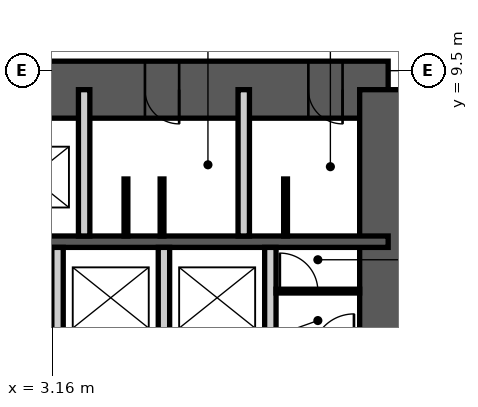
"""IFC4 building model, lengths in metres.
Left out: names, types, materials, properties, quantities, classifications, styles, units other than length and angle.
Written with IfcOpenShell. Run it as: python <this file> out.ifc"""

import sys

from ifc_helpers import new_model, si_unit, direction, frame, frame_2d, origin, place, context, subcontext, project, spatial, rectangle, extrude, element, fill, save


model = new_model("IFC4")
c1 = context("Model", 3, precision=1e-05, world=origin(), true_north=direction((0.0, 1.0)))
c2 = subcontext(c1, "Body", "Model", "MODEL_VIEW")
j1 = project(units=[si_unit("LENGTHUNIT", "METRE"), si_unit("PLANEANGLEUNIT", "RADIAN")], contexts=[c1])
p1 = place(None, origin())
s1 = spatial("IfcSite", under=j1, at=p1, CompositionType="ELEMENT")
p2 = place(p1, origin())
s2 = spatial("IfcBuilding", under=s1, at=p2, CompositionType="ELEMENT")
p3 = place(p2, frame((0.0, 0.0, 62.0)))
s3 = spatial("IfcBuildingStorey", under=s2, at=p3, CompositionType="ELEMENT", Elevation=62.0)
p4 = place(p3, frame((-12.0, 9.0, 0.0), z_axis=(0.0, 0.0, 1.0), x_axis=(1.0, 0.0, 0.0)))
e1 = element("IfcWall", 1, at=p4, inside=s3, PredefinedType="SHEAR", context=c2, shape_type="SweptSolid", body=[
    extrude(rectangle(XDim=24.0, YDim=1.5, at=frame_2d((12.0, 0.0))), origin(), (0.0, 0.0, 1.0), 5.0),
])
p5 = place(p4, frame((10.4, 0.0, 0.0)))
e2 = element("IfcOpeningElement", 2, at=p5, cuts=e1, PredefinedType="OPENING", context=c2, shape_type="SweptSolid", body=[
    extrude(rectangle(XDim=1.0, YDim=2.1, at=frame_2d((0.5, 1.05))), frame((0.0, 0.76, 0.0), z_axis=(0.0, -1.0, 0.0), x_axis=(1.0, 0.0, 0.0)), (0.0, 0.0, 1.0), 1.52),
])
p6 = place(p4, frame((17.6, 0.0, 0.0)))
e3 = element("IfcOpeningElement", 3, at=p6, cuts=e1, PredefinedType="OPENING", context=c2, shape_type="SweptSolid", body=[
    extrude(rectangle(XDim=0.9, YDim=2.1, at=frame_2d((0.45, 1.05))), frame((0.0, 0.76, 0.0), z_axis=(0.0, -1.0, 0.0), x_axis=(1.0, 0.0, 0.0)), (0.0, 0.0, 1.0), 1.52),
])
p7 = place(p4, frame((21.9, 0.0, 0.0)))
e4 = element("IfcOpeningElement", 4, at=p7, cuts=e1, PredefinedType="OPENING", context=c2, shape_type="SweptSolid", body=[
    extrude(rectangle(XDim=0.9, YDim=2.1, at=frame_2d((0.45, 1.05))), frame((0.0, 0.76, 0.0), z_axis=(0.0, -1.0, 0.0), x_axis=(1.0, 0.0, 0.0)), (0.0, 0.0, 1.0), 1.52),
])
p8 = place(p3, frame((12.0, -9.0, 0.0), z_axis=(0.0, 0.0, 1.0), x_axis=(0.0, 1.0, 0.0)))
e5 = element("IfcWall", 5, at=p8, inside=s3, PredefinedType="SHEAR", context=c2, shape_type="SweptSolid", body=[
    extrude(rectangle(XDim=18.0, YDim=1.5, at=frame_2d((9.0, 0.0))), origin(), (0.0, 0.0, 1.0), 5.0),
])
p9 = place(p8, frame((8.1, 0.0, 0.0)))
e6 = element("IfcOpeningElement", 6, at=p9, cuts=e5, PredefinedType="OPENING", context=c2, shape_type="SweptSolid", body=[
    extrude(rectangle(XDim=1.8, YDim=2.1, at=frame_2d((0.9, 1.05))), frame((0.0, 0.76, 0.0), z_axis=(0.0, -1.0, 0.0), x_axis=(1.0, 0.0, 0.0)), (0.0, 0.0, 1.0), 1.52),
])
p10 = place(p3, frame((-12.0, 5.0, 0.0), z_axis=(0.0, 0.0, 1.0), x_axis=(1.0, 0.0, 0.0)))
e7 = element("IfcWall", 7, at=p10, inside=s3, PredefinedType="SHEAR", context=c2, shape_type="SweptSolid", body=[
    extrude(rectangle(XDim=24.0, YDim=0.3, at=frame_2d((12.0, 0.0))), origin(), (0.0, 0.0, 1.0), 5.0),
])
for number, where, z_axis, x_axis in (
    (8, (4.0, 5.15, 0.0), (0.0, 0.0, 1.0), (0.0, 1.0, 0.0)),
    (9, (8.2, 5.15, 0.0), (0.0, 0.0, 1.0), (0.0, 1.0, 0.0)),
):
    element("IfcWall", number, at=place(p3, frame(where, z_axis=z_axis, x_axis=x_axis)), inside=s3, PredefinedType="PARTITIONING", context=c2, shape_type="SweptSolid", body=[
        extrude(rectangle(XDim=3.85, YDim=0.3, at=frame_2d((1.925, 0.0))), origin(), (0.0, 0.0, 1.0), 4.78),
    ])
for number, where, z_axis, x_axis in (
    (10, (3.3, 2.2, 0.0), (0.0, 0.0, 1.0), (0.0, 1.0, 0.0)),
    (11, (6.1, 2.2, 0.0), (0.0, 0.0, 1.0), (0.0, 1.0, 0.0)),
    (12, (8.9, 2.2, 0.0), (0.0, 0.0, 1.0), (0.0, 1.0, 0.0)),
):
    element("IfcWall", number, at=place(p3, frame(where, z_axis=z_axis, x_axis=x_axis)), inside=s3, PredefinedType="PARTITIONING", context=c2, shape_type="SweptSolid", body=[
        extrude(rectangle(XDim=2.65, YDim=0.3, at=frame_2d((1.325, 0.0))), origin(), (0.0, 0.0, 1.0), 4.78),
    ])
p11 = place(p3, frame((9.05, 3.7, 0.0), z_axis=(0.0, 0.0, 1.0), x_axis=(1.0, 0.0, 0.0)))
e13 = element("IfcWall", 13, at=p11, inside=s3, PredefinedType="PARTITIONING", context=c2, shape_type="SweptSolid", body=[
    extrude(rectangle(XDim=2.2, YDim=0.1, at=frame_2d((1.1, 0.0))), origin(), (0.0, 0.0, 1.0), 4.78),
])
p12 = place(p11, frame((0.1, 0.0, 0.0)))
e14 = element("IfcOpeningElement", 14, at=p12, cuts=e13, PredefinedType="OPENING", context=c2, shape_type="SweptSolid", body=[
    extrude(rectangle(XDim=1.0, YDim=2.4, at=frame_2d((0.5, 1.2))), frame((0.0, 0.06, 0.0), z_axis=(0.0, -1.0, 0.0), x_axis=(1.0, 0.0, 0.0)), (0.0, 0.0, 1.0), 0.12),
])
for number, where, z_axis, x_axis in (
    (15, (5.1, 5.15, 0.0), (0.0, 0.0, 1.0), (0.0, 1.0, 0.0)),
    (16, (6.05, 5.15, 0.0), (0.0, 0.0, 1.0), (0.0, 1.0, 0.0)),
    (17, (9.3, 5.15, 0.0), (0.0, 0.0, 1.0), (0.0, 1.0, 0.0)),
):
    element("IfcWall", number, at=place(p3, frame(where, z_axis=z_axis, x_axis=x_axis)), inside=s3, PredefinedType="PARTITIONING", context=c2, shape_type="SweptSolid", body=[
        extrude(rectangle(XDim=1.5, YDim=0.1, at=frame_2d((0.75, 0.0))), origin(), (0.0, 0.0, 1.0), 2.1),
    ])
p13 = place(p6, origin())
e18 = element("IfcDoor", 18, at=p13, inside=s3, OperationType="SINGLE_SWING_RIGHT", PredefinedType="DOOR", context=c2, shape_type="SweptSolid", body=[
    extrude(rectangle(XDim=0.9, YDim=2.1, at=frame_2d((0.45, 1.05))), frame((0.0, 0.025, 0.0), z_axis=(0.0, -1.0, 0.0), x_axis=(1.0, 0.0, 0.0)), (0.0, 0.0, 1.0), 0.05),
])
fill(e3, e18)
p14 = place(p7, origin())
e19 = element("IfcDoor", 19, at=p14, inside=s3, OperationType="SINGLE_SWING_RIGHT", PredefinedType="DOOR", context=c2, shape_type="SweptSolid", body=[
    extrude(rectangle(XDim=0.9, YDim=2.1, at=frame_2d((0.45, 1.05))), frame((0.0, 0.025, 0.0), z_axis=(0.0, -1.0, 0.0), x_axis=(1.0, 0.0, 0.0)), (0.0, 0.0, 1.0), 0.05),
])
fill(e4, e19)
p15 = place(p12, origin())
e20 = element("IfcDoor", 20, at=p15, inside=s3, OperationType="SINGLE_SWING_RIGHT", PredefinedType="DOOR", context=c2, shape_type="SweptSolid", body=[
    extrude(rectangle(XDim=1.0, YDim=2.4, at=frame_2d((0.5, 1.2))), frame((0.0, 0.025, 0.0), z_axis=(0.0, -1.0, 0.0), x_axis=(1.0, 0.0, 0.0)), (0.0, 0.0, 1.0), 0.05),
])
fill(e14, e20)
save(model, sys.argv[1])
